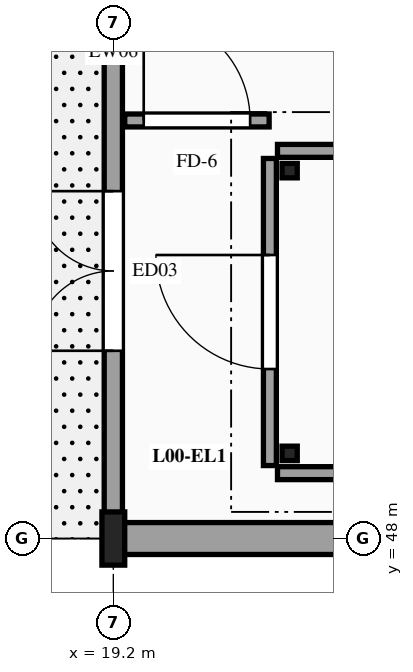
"""IFC4 building model, lengths in metres.
Left out: names, types, materials, properties, quantities, classifications, styles, units other than length and angle.
Written with IfcOpenShell. Run it as: python <this file> out.ifc"""

import sys

from ifc_helpers import new_model, si_unit, direction, frame, frame_2d, origin, origin_2d, place, context, subcontext, project, spatial, rectangle, i_section, extrude, element, fill, save


model = new_model("IFC4")
c1 = context("Model", 3, precision=1e-05, world=origin(), true_north=direction((0.0, 1.0)))
c2 = subcontext(c1, "Body", "Model", "MODEL_VIEW")
j1 = project(units=[si_unit("LENGTHUNIT", "METRE"), si_unit("PLANEANGLEUNIT", "RADIAN")], contexts=[c1])
p1 = place(None, origin())
s1 = spatial("IfcSite", under=j1, at=p1, CompositionType="ELEMENT")
p2 = place(p1, origin())
s2 = spatial("IfcBuilding", under=s1, at=p2, CompositionType="ELEMENT")
p3 = place(p2, origin())
s3 = spatial("IfcBuildingStorey", under=s2, at=p3, CompositionType="ELEMENT", Elevation=0.0)
p4 = place(p3, frame((19.2, 48.0, -0.28), z_axis=(0.0, 0.0, 1.0), x_axis=(1.0, 0.0, 0.0)))
e1 = element("IfcColumn", 1, at=p4, inside=s3, PredefinedType="COLUMN", context=c2, shape_type="SweptSolid", body=[
    extrude(i_section(OverallWidth=0.3, OverallDepth=0.7, WebThickness=0.017, FlangeThickness=0.032, FilletRadius=0.027, at=origin_2d()), origin(), (0.0, 0.0, 1.0), 4.52),
])
for number, where, z_axis, x_axis in (
    (2, (21.52, 49.12, 0.0), (0.0, 0.0, 1.0), (1.0, 0.0, 0.0)),
    (3, (21.52, 52.84, 0.0), (0.0, 0.0, 1.0), (1.0, 0.0, 0.0)),
):
    element("IfcColumn", number, at=place(p3, frame(where, z_axis=z_axis, x_axis=x_axis)), inside=s3, PredefinedType="COLUMN", context=c2, shape_type="SweptSolid", body=[
        extrude(i_section(OverallWidth=0.2, OverallDepth=0.19, WebThickness=0.007, FlangeThickness=0.01, FilletRadius=0.018, at=origin_2d()), origin(), (0.0, 0.0, 1.0), 4.5),
    ])
p5 = place(p3, frame((19.2, 48.02, 0.0), z_axis=(0.0, 0.0, 1.0), x_axis=(0.0, 1.0, 0.0)))
e4 = element("IfcWall", 4, at=p5, inside=s3, PredefinedType="SOLIDWALL", context=c2, shape_type="SweptSolid", body=[
    extrude(rectangle(XDim=7.96, YDim=0.24, at=frame_2d((3.98, 0.0))), origin(), (0.0, 0.0, 1.0), 3.56),
])
p6 = place(p5, frame((2.45, 0.0, 0.0)))
e5 = element("IfcOpeningElement", 5, at=p6, cuts=e4, PredefinedType="OPENING", context=c2, shape_type="SweptSolid", body=[
    extrude(rectangle(XDim=2.1, YDim=2.4, at=frame_2d((1.05, 1.2))), frame((0.0, 0.13, 0.0), z_axis=(0.0, -1.0, 0.0), x_axis=(1.0, 0.0, 0.0)), (0.0, 0.0, 1.0), 0.26),
])
p7 = place(p3, frame((19.22, 48.0, 0.0), z_axis=(0.0, 0.0, 1.0), x_axis=(1.0, 0.0, 0.0)))
e6 = element("IfcWall", 6, at=p7, inside=s3, PredefinedType="SOLIDWALL", context=c2, shape_type="SweptSolid", body=[
    extrude(rectangle(XDim=9.56, YDim=0.42, at=frame_2d((4.78, 0.0))), origin(), (0.0, 0.0, 1.0), 3.56),
])
p8 = place(p3, frame((21.26, 48.96, 0.0), z_axis=(0.0, 0.0, 1.0), x_axis=(0.0, 1.0, 0.0)))
e7 = element("IfcWall", 7, at=p8, inside=s3, PredefinedType="SOLIDWALL", context=c2, shape_type="SweptSolid", body=[
    extrude(rectangle(XDim=4.04, YDim=0.17, at=frame_2d((2.02, 0.0))), origin(), (0.0, 0.0, 1.0), 3.6),
])
p9 = place(p8, frame((1.27, 0.0, 0.0)))
e8 = element("IfcOpeningElement", 8, at=p9, cuts=e7, PredefinedType="OPENING", context=c2, shape_type="SweptSolid", body=[
    extrude(rectangle(XDim=1.5, YDim=2.2, at=frame_2d((0.75, 1.1))), frame((0.0, 0.095, 0.0), z_axis=(0.0, -1.0, 0.0), x_axis=(1.0, 0.0, 0.0)), (0.0, 0.0, 1.0), 0.19),
])
for number, where, z_axis, x_axis in (
    (9, (21.36, 48.86, 0.0), (0.0, 0.0, 1.0), (1.0, 0.0, 0.0)),
    (10, (21.36, 53.1, 0.0), (0.0, 0.0, 1.0), (1.0, 0.0, 0.0)),
):
    element("IfcWall", number, at=place(p3, frame(where, z_axis=z_axis, x_axis=x_axis)), inside=s3, PredefinedType="SOLIDWALL", context=c2, shape_type="SweptSolid", body=[
        extrude(rectangle(XDim=10.0, YDim=0.17, at=frame_2d((5.0, 0.0))), origin(), (0.0, 0.0, 1.0), 3.6),
    ])
p10 = place(p3, frame((19.35, 53.5, 0.0), z_axis=(0.0, 0.0, 1.0), x_axis=(1.0, 0.0, 0.0)))
e11 = element("IfcWall", 11, at=p10, inside=s3, PredefinedType="SOLIDWALL", context=c2, shape_type="SweptSolid", body=[
    extrude(rectangle(XDim=1.9, YDim=0.17, at=frame_2d((0.95, 0.0))), origin(), (0.0, 0.0, 1.0), 3.6),
])
p11 = place(p10, frame((0.25, 0.0, 0.0)))
e12 = element("IfcOpeningElement", 12, at=p11, cuts=e11, PredefinedType="OPENING", context=c2, shape_type="SweptSolid", body=[
    extrude(rectangle(XDim=1.4, YDim=2.15, at=frame_2d((0.7, 1.075))), frame((0.0, 0.095, 0.0), z_axis=(0.0, -1.0, 0.0), x_axis=(1.0, 0.0, 0.0)), (0.0, 0.0, 1.0), 0.19),
])
p12 = place(p6, origin())
e13 = element("IfcDoor", 13, at=p12, inside=s3, OperationType="DOUBLE_DOOR_SINGLE_SWING", PredefinedType="DOOR", context=c2, shape_type="SweptSolid", body=[
    extrude(rectangle(XDim=2.1, YDim=2.4, at=frame_2d((1.05, 1.2))), frame((0.0, 0.025, 0.0), z_axis=(0.0, -1.0, 0.0), x_axis=(1.0, 0.0, 0.0)), (0.0, 0.0, 1.0), 0.05),
])
fill(e5, e13)
p13 = place(p9, origin())
e14 = element("IfcDoor", 14, at=p13, inside=s3, OperationType="SINGLE_SWING_RIGHT", PredefinedType="DOOR", context=c2, shape_type="SweptSolid", body=[
    extrude(rectangle(XDim=1.5, YDim=2.2, at=frame_2d((0.75, 1.1))), frame((0.0, 0.025, 0.0), z_axis=(0.0, -1.0, 0.0), x_axis=(1.0, 0.0, 0.0)), (0.0, 0.0, 1.0), 0.05),
])
fill(e8, e14)
p14 = place(p11, origin())
e15 = element("IfcDoor", 15, at=p14, inside=s3, OperationType="SINGLE_SWING_LEFT", PredefinedType="DOOR", context=c2, shape_type="SweptSolid", body=[
    extrude(rectangle(XDim=1.4, YDim=2.15, at=frame_2d((0.7, 1.075))), frame((0.0, 0.025, 0.0), z_axis=(0.0, -1.0, 0.0), x_axis=(1.0, 0.0, 0.0)), (0.0, 0.0, 1.0), 0.05),
])
fill(e12, e15)
save(model, sys.argv[1])
